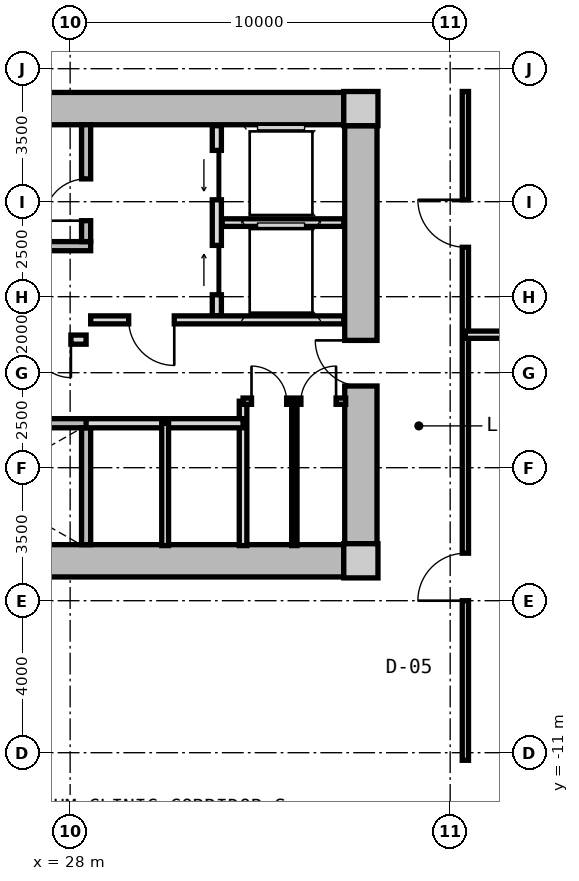
"""IFC4 building model, lengths in metres.
Left out: names, types, materials, properties, quantities, classifications, styles, units other than length and angle.
Written with IfcOpenShell. Run it as: python <this file> out.ifc"""

import sys

from ifc_helpers import new_model, si_unit, direction, frame, frame_2d, origin, origin_2d, place, context, subcontext, project, spatial, rectangle, extrude, source, transform, mapped, element, fill, save


model = new_model("IFC4")
c1 = context("Model", 3, precision=1e-05, world=origin(), true_north=direction((0.0, 1.0)))
c2 = subcontext(c1, "Body", "Model", "MODEL_VIEW")
j1 = project(units=[si_unit("LENGTHUNIT", "METRE"), si_unit("PLANEANGLEUNIT", "RADIAN")], contexts=[c1])
p1 = place(None, origin())
s1 = spatial("IfcSite", under=j1, at=p1, CompositionType="ELEMENT")
p2 = place(p1, origin())
s2 = spatial("IfcBuilding", under=s1, at=p2, CompositionType="ELEMENT")
p3 = place(p2, frame((0.0, 0.0, 8.4)))
s3 = spatial("IfcBuildingStorey", under=s2, at=p3, CompositionType="ELEMENT", Elevation=8.4)
m1 = source(origin(), c2, "Body", "SweptSolid", [
    extrude(rectangle(XDim=0.9, YDim=0.9, at=origin_2d()), origin(), (0.0, 0.0, 1.0), 4.2),
])
for number, where, z_axis, x_axis in (
    (1, (35.65, -5.95, 0.0), (0.0, 0.0, 1.0), (1.0, 0.0, 0.0)),
    (2, (35.65, 5.95, 0.0), (0.0, 0.0, 1.0), (1.0, 0.0, 0.0)),
):
    element("IfcColumn", number, at=place(p3, frame(where, z_axis=z_axis, x_axis=x_axis)), inside=s3, PredefinedType="COLUMN", context=c2, shape_type="MappedRepresentation", body=[
        mapped(m1, transform((0.0, 0.0, 0.0), x_axis=(1.0, 0.0, 0.0), y_axis=(0.0, 1.0, 0.0), z_axis=(0.0, 0.0, 1.0), scale=1.0)),
    ])
m2 = source(origin(), c2, "Body", "SweptSolid", [
    extrude(rectangle(XDim=14.4, YDim=0.85, at=frame_2d((7.2, 0.0))), origin(), (0.0, 0.0, 1.0), 3.88),
])
for number, where, z_axis, x_axis in (
    (3, (20.8, 5.95, 0.0), (0.0, 0.0, 1.0), (1.0, 0.0, 0.0)),
    (4, (35.2, -5.95, 0.0), (0.0, 0.0, 1.0), (-1.0, 0.0, 0.0)),
):
    element("IfcWall", number, at=place(p3, frame(where, z_axis=z_axis, x_axis=x_axis)), inside=s3, PredefinedType="SHEAR", context=c2, shape_type="MappedRepresentation", body=[
        mapped(m2, transform((0.0, 0.0, 0.0), x_axis=(1.0, 0.0, 0.0), y_axis=(0.0, 1.0, 0.0), z_axis=(0.0, 0.0, 1.0), scale=1.0)),
    ])
m3 = source(origin(), c2, "Body", "SweptSolid", [
    extrude(rectangle(XDim=11.0, YDim=0.85, at=frame_2d((5.5, 0.0))), origin(), (0.0, 0.0, 1.0), 3.88),
])
p4 = place(p3, frame((35.65, 5.5, 0.0), z_axis=(0.0, 0.0, 1.0), x_axis=(0.0, -1.0, 0.0)))
e5 = element("IfcWall", 5, at=p4, inside=s3, PredefinedType="SHEAR", context=c2, shape_type="MappedRepresentation", body=[
    mapped(m3, transform((0.0, 0.0, 0.0), x_axis=(1.0, 0.0, 0.0), y_axis=(0.0, 1.0, 0.0), z_axis=(0.0, 0.0, 1.0), scale=1.0)),
])
p5 = place(p4, frame((5.65, 0.0, 0.0)))
e6 = element("IfcOpeningElement", 6, at=p5, cuts=e5, PredefinedType="OPENING", context=c2, shape_type="SweptSolid", body=[
    extrude(rectangle(XDim=1.2, YDim=2.15, at=frame_2d((0.6, 1.075))), frame((0.0, 0.435, 0.0), z_axis=(0.0, -1.0, 0.0), x_axis=(1.0, 0.0, 0.0)), (0.0, 0.0, 1.0), 0.87),
])
m4 = source(origin(), c2, "Body", "SweptSolid", [
    extrude(rectangle(XDim=7.765, YDim=0.24, at=frame_2d((3.883, 0.0))), origin(), (0.0, 0.0, 1.0), 3.88),
])
p6 = place(p3, frame((20.775, 2.33, 0.0), z_axis=(0.0, 0.0, 1.0), x_axis=(1.0, 0.0, 0.0)))
e7 = element("IfcWall", 7, at=p6, inside=s3, PredefinedType="PARTITIONING", context=c2, shape_type="MappedRepresentation", body=[
    mapped(m4, transform((0.0, 0.0, 0.0), x_axis=(1.0, 0.0, 0.0), y_axis=(0.0, 1.0, 0.0), z_axis=(0.0, 0.0, 1.0), scale=1.0)),
])
m5 = source(origin(), c2, "Body", "SweptSolid", [
    extrude(rectangle(XDim=3.075, YDim=0.24, at=frame_2d((1.538, 0.0))), origin(), (0.0, 0.0, 1.0), 3.88),
])
p7 = place(p3, frame((28.42, 2.45, 0.0), z_axis=(0.0, 0.0, 1.0), x_axis=(0.0, 1.0, 0.0)))
e8 = element("IfcWall", 8, at=p7, inside=s3, PredefinedType="PARTITIONING", context=c2, shape_type="MappedRepresentation", body=[
    mapped(m5, transform((0.0, 0.0, 0.0), x_axis=(1.0, 0.0, 0.0), y_axis=(0.0, 1.0, 0.0), z_axis=(0.0, 0.0, 1.0), scale=1.0)),
])
p8 = place(p7, frame((0.55, 0.0, 0.0)))
e9 = element("IfcOpeningElement", 9, at=p8, cuts=e8, PredefinedType="OPENING", context=c2, shape_type="SweptSolid", body=[
    extrude(rectangle(XDim=1.1, YDim=2.15, at=frame_2d((0.55, 1.075))), frame((0.0, 0.13, 0.0), z_axis=(0.0, -1.0, 0.0), x_axis=(1.0, 0.0, 0.0)), (0.0, 0.0, 1.0), 0.26),
])
p9 = place(p3, frame((20.775, -2.33, 0.0), z_axis=(0.0, 0.0, 1.0), x_axis=(1.0, 0.0, 0.0)))
e10 = element("IfcWall", 10, at=p9, inside=s3, PredefinedType="PARTITIONING", context=c2, shape_type="MappedRepresentation", body=[
    mapped(m4, transform((0.0, 0.0, 0.0), x_axis=(1.0, 0.0, 0.0), y_axis=(0.0, 1.0, 0.0), z_axis=(0.0, 0.0, 1.0), scale=1.0)),
])
p10 = place(p9, frame((0.885, 0.0, 0.0)))
e11 = element("IfcOpeningElement", 11, at=p10, cuts=e10, PredefinedType="OPENING", context=c2, shape_type="SweptSolid", body=[
    extrude(rectangle(XDim=1.1, YDim=2.15, at=frame_2d((0.55, 1.075))), frame((0.0, 0.13, 0.0), z_axis=(0.0, -1.0, 0.0), x_axis=(1.0, 0.0, 0.0)), (0.0, 0.0, 1.0), 0.26),
])
p11 = place(p3, frame((28.42, -5.525, 0.0), z_axis=(0.0, 0.0, 1.0), x_axis=(0.0, 1.0, 0.0)))
e12 = element("IfcWall", 12, at=p11, inside=s3, PredefinedType="PARTITIONING", context=c2, shape_type="MappedRepresentation", body=[
    mapped(m5, transform((0.0, 0.0, 0.0), x_axis=(1.0, 0.0, 0.0), y_axis=(0.0, 1.0, 0.0), z_axis=(0.0, 0.0, 1.0), scale=1.0)),
])
m6 = source(origin(), c2, "Body", "SweptSolid", [
    extrude(rectangle(XDim=5.0, YDim=0.24, at=frame_2d((2.5, 0.0))), origin(), (0.0, 0.0, 1.0), 3.865),
])
p12 = place(p3, frame((31.86, 0.5, 0.0), z_axis=(0.0, 0.0, 1.0), x_axis=(0.0, 1.0, 0.0)))
e13 = element("IfcWall", 13, at=p12, inside=s3, PredefinedType="PARTITIONING", context=c2, shape_type="MappedRepresentation", body=[
    mapped(m6, transform((0.0, 0.0, 0.0), x_axis=(1.0, 0.0, 0.0), y_axis=(0.0, 1.0, 0.0), z_axis=(0.0, 0.0, 1.0), scale=1.0)),
])
p13 = place(p12, frame((3.05, 0.0, 0.0)))
e14 = element("IfcOpeningElement", 14, at=p13, cuts=e13, PredefinedType="OPENING", context=c2, shape_type="SweptSolid", body=[
    extrude(rectangle(XDim=1.3, YDim=2.2, at=frame_2d((0.65, 1.1))), frame((0.0, 0.13, 0.0), z_axis=(0.0, -1.0, 0.0), x_axis=(1.0, 0.0, 0.0)), (0.0, 0.0, 1.0), 0.26),
])
p14 = place(p12, frame((0.55, 0.0, 0.0)))
e15 = element("IfcOpeningElement", 15, at=p14, cuts=e13, PredefinedType="OPENING", context=c2, shape_type="SweptSolid", body=[
    extrude(rectangle(XDim=1.3, YDim=2.2, at=frame_2d((0.65, 1.1))), frame((0.0, 0.13, 0.0), z_axis=(0.0, -1.0, 0.0), x_axis=(1.0, 0.0, 0.0)), (0.0, 0.0, 1.0), 0.26),
])
m7 = source(origin(), c2, "Body", "SweptSolid", [
    extrude(rectangle(XDim=3.2, YDim=0.2, at=frame_2d((1.6, 0.0))), origin(), (0.0, 0.0, 1.0), 3.865),
])
p15 = place(p3, frame((32.0, 2.95, 0.0), z_axis=(0.0, 0.0, 1.0), x_axis=(1.0, 0.0, 0.0)))
e16 = element("IfcWall", 16, at=p15, inside=s3, PredefinedType="PARTITIONING", context=c2, shape_type="MappedRepresentation", body=[
    mapped(m7, transform((0.0, 0.0, 0.0), x_axis=(1.0, 0.0, 0.0), y_axis=(0.0, 1.0, 0.0), z_axis=(0.0, 0.0, 1.0), scale=1.0)),
])
m8 = source(origin(), c2, "Body", "SweptSolid", [
    extrude(rectangle(XDim=6.66, YDim=0.21, at=frame_2d((3.33, 0.0))), origin(), (0.0, 0.0, 1.0), 3.865),
])
p16 = place(p3, frame((28.54, 0.39, 0.0), z_axis=(0.0, 0.0, 1.0), x_axis=(1.0, 0.0, 0.0)))
e17 = element("IfcWall", 17, at=p16, inside=s3, PredefinedType="PARTITIONING", context=c2, shape_type="MappedRepresentation", body=[
    mapped(m8, transform((0.0, 0.0, 0.0), x_axis=(1.0, 0.0, 0.0), y_axis=(0.0, 1.0, 0.0), z_axis=(0.0, 0.0, 1.0), scale=1.0)),
])
p17 = place(p16, frame((1.0, 0.0, 0.0)))
e18 = element("IfcOpeningElement", 18, at=p17, cuts=e17, PredefinedType="OPENING", context=c2, shape_type="SweptSolid", body=[
    extrude(rectangle(XDim=1.2, YDim=2.15, at=frame_2d((0.6, 1.075))), frame((0.0, 0.115, 0.0), z_axis=(0.0, -1.0, 0.0), x_axis=(1.0, 0.0, 0.0)), (0.0, 0.0, 1.0), 0.23),
])
m9 = source(origin(), c2, "Body", "SweptSolid", [
    extrude(rectangle(XDim=7.62, YDim=0.24, at=frame_2d((3.81, 0.0))), origin(), (0.0, 0.0, 1.0), 3.865),
])
p18 = place(p3, frame((20.8, -0.13, 0.0), z_axis=(0.0, 0.0, 1.0), x_axis=(1.0, 0.0, 0.0)))
e19 = element("IfcWall", 19, at=p18, inside=s3, PredefinedType="PARTITIONING", context=c2, shape_type="MappedRepresentation", body=[
    mapped(m9, transform((0.0, 0.0, 0.0), x_axis=(1.0, 0.0, 0.0), y_axis=(0.0, 1.0, 0.0), z_axis=(0.0, 0.0, 1.0), scale=1.0)),
])
p19 = place(p18, frame((6.22, 0.0, 0.0)))
e20 = element("IfcOpeningElement", 20, at=p19, cuts=e19, PredefinedType="OPENING", context=c2, shape_type="SweptSolid", body=[
    extrude(rectangle(XDim=1.0, YDim=2.1, at=frame_2d((0.5, 1.05))), frame((0.0, 0.13, 0.0), z_axis=(0.0, -1.0, 0.0), x_axis=(1.0, 0.0, 0.0)), (0.0, 0.0, 1.0), 0.26),
])
p20 = place(p18, frame((0.85, 0.0, 0.0)))
e21 = element("IfcOpeningElement", 21, at=p20, cuts=e19, PredefinedType="OPENING", context=c2, shape_type="SweptSolid", body=[
    extrude(rectangle(XDim=1.1, YDim=2.2, at=frame_2d((0.55, 1.1))), frame((0.0, 0.13, 0.0), z_axis=(0.0, -1.0, 0.0), x_axis=(1.0, 0.0, 0.0)), (0.0, 0.0, 1.0), 0.26),
])
p21 = place(p18, frame((3.85, 0.0, 0.0)))
e22 = element("IfcOpeningElement", 22, at=p21, cuts=e19, PredefinedType="OPENING", context=c2, shape_type="SweptSolid", body=[
    extrude(rectangle(XDim=1.1, YDim=2.2, at=frame_2d((0.55, 1.1))), frame((0.0, 0.13, 0.0), z_axis=(0.0, -1.0, 0.0), x_axis=(1.0, 0.0, 0.0)), (0.0, 0.0, 1.0), 0.26),
])
m10 = source(origin(), c2, "Body", "SweptSolid", [
    extrude(rectangle(XDim=3.8, YDim=0.2, at=frame_2d((1.9, 0.0))), origin(), (0.0, 0.0, 1.0), 3.865),
])
p22 = place(p3, frame((32.55, -5.55, 0.0), z_axis=(0.0, 0.0, 1.0), x_axis=(0.0, 1.0, 0.0)))
e23 = element("IfcWall", 23, at=p22, inside=s3, PredefinedType="PARTITIONING", context=c2, shape_type="MappedRepresentation", body=[
    mapped(m10, transform((0.0, 0.0, 0.0), x_axis=(1.0, 0.0, 0.0), y_axis=(0.0, 1.0, 0.0), z_axis=(0.0, 0.0, 1.0), scale=1.0)),
])
m11 = source(origin(), c2, "Body", "SweptSolid", [
    extrude(rectangle(XDim=4.13, YDim=0.24, at=frame_2d((2.065, 0.0))), origin(), (0.0, 0.0, 1.0), 3.865),
])
p23 = place(p3, frame((28.42, -2.33, 0.0), z_axis=(0.0, 0.0, 1.0), x_axis=(1.0, 0.0, 0.0)))
e24 = element("IfcWall", 24, at=p23, inside=s3, PredefinedType="PARTITIONING", context=c2, shape_type="MappedRepresentation", body=[
    mapped(m11, transform((0.0, 0.0, 0.0), x_axis=(1.0, 0.0, 0.0), y_axis=(0.0, 1.0, 0.0), z_axis=(0.0, 0.0, 1.0), scale=1.0)),
])
m12 = source(origin(), c2, "Body", "SweptSolid", [
    extrude(rectangle(XDim=3.22, YDim=0.18, at=frame_2d((1.61, 0.0))), origin(), (0.0, 0.0, 1.0), 3.865),
])
p24 = place(p3, frame((30.5, -5.55, 0.0), z_axis=(0.0, 0.0, 1.0), x_axis=(0.0, 1.0, 0.0)))
e25 = element("IfcWall", 25, at=p24, inside=s3, PredefinedType="PARTITIONING", context=c2, shape_type="MappedRepresentation", body=[
    mapped(m12, transform((0.0, 0.0, 0.0), x_axis=(1.0, 0.0, 0.0), y_axis=(0.0, 1.0, 0.0), z_axis=(0.0, 0.0, 1.0), scale=1.0)),
])
m13 = source(origin(), c2, "Body", "SweptSolid", [
    extrude(rectangle(XDim=2.7, YDim=0.165, at=frame_2d((1.35, 0.0))), origin(), (0.0, 0.0, 1.0), 3.865),
])
p25 = place(p3, frame((32.55, -1.75, 0.0), z_axis=(0.0, 0.0, 1.0), x_axis=(1.0, 0.0, 0.0)))
e26 = element("IfcWall", 26, at=p25, inside=s3, PredefinedType="PARTITIONING", context=c2, shape_type="MappedRepresentation", body=[
    mapped(m13, transform((0.0, 0.0, 0.0), x_axis=(1.0, 0.0, 0.0), y_axis=(0.0, 1.0, 0.0), z_axis=(0.0, 0.0, 1.0), scale=1.0)),
])
p26 = place(p25, frame((0.222, 0.0, 0.0)))
e27 = element("IfcOpeningElement", 27, at=p26, cuts=e26, PredefinedType="OPENING", context=c2, shape_type="SweptSolid", body=[
    extrude(rectangle(XDim=0.925, YDim=2.1, at=frame_2d((0.462, 1.05))), frame((0.0, 0.093, 0.0), z_axis=(0.0, -1.0, 0.0), x_axis=(1.0, 0.0, 0.0)), (0.0, 0.0, 1.0), 0.185),
])
p27 = place(p25, frame((1.522, 0.0, 0.0)))
e28 = element("IfcOpeningElement", 28, at=p27, cuts=e26, PredefinedType="OPENING", context=c2, shape_type="SweptSolid", body=[
    extrude(rectangle(XDim=0.925, YDim=2.1, at=frame_2d((0.462, 1.05))), frame((0.0, 0.093, 0.0), z_axis=(0.0, -1.0, 0.0), x_axis=(1.0, 0.0, 0.0)), (0.0, 0.0, 1.0), 0.185),
])
m14 = source(origin(), c2, "Body", "SweptSolid", [
    extrude(rectangle(XDim=3.8, YDim=0.14, at=frame_2d((1.9, 0.0))), origin(), (0.0, 0.0, 1.0), 3.865),
])
p28 = place(p3, frame((33.9, -5.55, 0.0), z_axis=(0.0, 0.0, 1.0), x_axis=(0.0, 1.0, 0.0)))
e29 = element("IfcWall", 29, at=p28, inside=s3, PredefinedType="PARTITIONING", context=c2, shape_type="MappedRepresentation", body=[
    mapped(m14, transform((0.0, 0.0, 0.0), x_axis=(1.0, 0.0, 0.0), y_axis=(0.0, 1.0, 0.0), z_axis=(0.0, 0.0, 1.0), scale=1.0)),
])
m15 = source(origin(), c2, "Body", "SweptSolid", [
    extrude(rectangle(XDim=17.6, YDim=0.165, at=frame_2d((8.8, 0.0))), origin(), (0.0, 0.0, 1.0), 3.865),
])
p29 = place(p3, frame((38.4, -11.2, 0.0), z_axis=(0.0, 0.0, 1.0), x_axis=(0.0, 1.0, 0.0)))
e30 = element("IfcWall", 30, at=p29, inside=s3, PredefinedType="PARTITIONING", context=c2, shape_type="MappedRepresentation", body=[
    mapped(m15, transform((0.0, 0.0, 0.0), x_axis=(1.0, 0.0, 0.0), y_axis=(0.0, 1.0, 0.0), z_axis=(0.0, 0.0, 1.0), scale=1.0)),
])
p30 = place(p29, frame((4.2, 0.0, 0.0)))
e31 = element("IfcOpeningElement", 31, at=p30, cuts=e30, PredefinedType="OPENING", context=c2, shape_type="SweptSolid", body=[
    extrude(rectangle(XDim=1.25, YDim=2.2, at=frame_2d((0.625, 1.1))), frame((0.0, 0.093, 0.0), z_axis=(0.0, -1.0, 0.0), x_axis=(1.0, 0.0, 0.0)), (0.0, 0.0, 1.0), 0.185),
])
p31 = place(p29, frame((13.5, 0.0, 0.0)))
e32 = element("IfcOpeningElement", 32, at=p31, cuts=e30, PredefinedType="OPENING", context=c2, shape_type="SweptSolid", body=[
    extrude(rectangle(XDim=1.25, YDim=2.2, at=frame_2d((0.625, 1.1))), frame((0.0, 0.093, 0.0), z_axis=(0.0, -1.0, 0.0), x_axis=(1.0, 0.0, 0.0)), (0.0, 0.0, 1.0), 0.185),
])
m16 = source(origin(), c2, "Body", "SweptSolid", [
    extrude(rectangle(XDim=12.65, YDim=0.19, at=frame_2d((6.325, 0.0))), origin(), (0.0, 0.0, 1.0), 3.865),
])
p32 = place(p3, frame((38.4, 0.0, 0.0), z_axis=(0.0, 0.0, 1.0), x_axis=(1.0, 0.0, 0.0)))
e33 = element("IfcWall", 33, at=p32, inside=s3, PredefinedType="PARTITIONING", context=c2, shape_type="MappedRepresentation", body=[
    mapped(m16, transform((0.0, 0.0, 0.0), x_axis=(1.0, 0.0, 0.0), y_axis=(0.0, 1.0, 0.0), z_axis=(0.0, 0.0, 1.0), scale=1.0)),
])
m17 = source(origin(), c2, "Body", "SweptSolid", [
    extrude(rectangle(XDim=1.1, YDim=2.15, at=frame_2d((0.55, 1.075))), frame((0.0, 0.025, 0.0), z_axis=(0.0, -1.0, 0.0), x_axis=(1.0, 0.0, 0.0)), (0.0, 0.0, 1.0), 0.05),
])
p33 = place(p8, origin())
e34 = element("IfcDoor", 34, at=p33, inside=s3, OperationType="SINGLE_SWING_LEFT", PredefinedType="DOOR", context=c2, shape_type="MappedRepresentation", body=[
    mapped(m17, transform((0.0, 0.0, 0.0), x_axis=(1.0, 0.0, 0.0), y_axis=(0.0, 1.0, 0.0), z_axis=(0.0, 0.0, 1.0), scale=1.0)),
])
fill(e9, e34)
m18 = source(origin(), c2, "Body", "SweptSolid", [
    extrude(rectangle(XDim=1.3, YDim=2.2, at=frame_2d((0.65, 1.1))), frame((0.0, 0.025, 0.0), z_axis=(0.0, -1.0, 0.0), x_axis=(1.0, 0.0, 0.0)), (0.0, 0.0, 1.0), 0.05),
])
p34 = place(p13, origin())
e35 = element("IfcDoor", 35, at=p34, inside=s3, OperationType="SLIDING_TO_LEFT", PredefinedType="DOOR", context=c2, shape_type="MappedRepresentation", body=[
    mapped(m18, transform((0.0, 0.0, 0.0), x_axis=(1.0, 0.0, 0.0), y_axis=(0.0, 1.0, 0.0), z_axis=(0.0, 0.0, 1.0), scale=1.0)),
])
fill(e14, e35)
p35 = place(p14, origin())
e36 = element("IfcDoor", 36, at=p35, inside=s3, OperationType="SLIDING_TO_RIGHT", PredefinedType="DOOR", context=c2, shape_type="MappedRepresentation", body=[
    mapped(m18, transform((0.0, 0.0, 0.0), x_axis=(1.0, 0.0, 0.0), y_axis=(0.0, 1.0, 0.0), z_axis=(0.0, 0.0, 1.0), scale=1.0)),
])
fill(e15, e36)
m19 = source(origin(), c2, "Body", "SweptSolid", [
    extrude(rectangle(XDim=1.2, YDim=2.15, at=frame_2d((0.6, 1.075))), frame((0.0, 0.025, 0.0), z_axis=(0.0, -1.0, 0.0), x_axis=(1.0, 0.0, 0.0)), (0.0, 0.0, 1.0), 0.05),
])
p36 = place(p17, frame((1.2, 0.0, 0.0), z_axis=(0.0, 0.0, 1.0), x_axis=(-1.0, 0.0, 0.0)))
e37 = element("IfcDoor", 37, at=p36, inside=s3, OperationType="SINGLE_SWING_LEFT", PredefinedType="DOOR", context=c2, shape_type="MappedRepresentation", body=[
    mapped(m19, transform((0.0, 0.0, 0.0), x_axis=(1.0, 0.0, 0.0), y_axis=(0.0, 1.0, 0.0), z_axis=(0.0, 0.0, 1.0), scale=1.0)),
])
fill(e18, e37)
p37 = place(p5, frame((1.2, 0.0, 0.0), z_axis=(0.0, 0.0, 1.0), x_axis=(-1.0, 0.0, 0.0)))
e38 = element("IfcDoor", 38, at=p37, inside=s3, OperationType="SINGLE_SWING_RIGHT", PredefinedType="DOOR", context=c2, shape_type="MappedRepresentation", body=[
    mapped(m19, transform((0.0, 0.0, 0.0), x_axis=(1.0, 0.0, 0.0), y_axis=(0.0, 1.0, 0.0), z_axis=(0.0, 0.0, 1.0), scale=1.0)),
])
fill(e6, e38)
m20 = source(origin(), c2, "Body", "SweptSolid", [
    extrude(rectangle(XDim=1.0, YDim=2.1, at=frame_2d((0.5, 1.05))), frame((0.0, 0.025, 0.0), z_axis=(0.0, -1.0, 0.0), x_axis=(1.0, 0.0, 0.0)), (0.0, 0.0, 1.0), 0.05),
])
p38 = place(p19, frame((1.0, 0.0, 0.0), z_axis=(0.0, 0.0, 1.0), x_axis=(-1.0, 0.0, 0.0)))
e39 = element("IfcDoor", 39, at=p38, inside=s3, OperationType="SINGLE_SWING_LEFT", PredefinedType="DOOR", context=c2, shape_type="MappedRepresentation", body=[
    mapped(m20, transform((0.0, 0.0, 0.0), x_axis=(1.0, 0.0, 0.0), y_axis=(0.0, 1.0, 0.0), z_axis=(0.0, 0.0, 1.0), scale=1.0)),
])
fill(e20, e39)
m21 = source(origin(), c2, "Body", "SweptSolid", [
    extrude(rectangle(XDim=0.925, YDim=2.1, at=frame_2d((0.462, 1.05))), frame((0.0, 0.025, 0.0), z_axis=(0.0, -1.0, 0.0), x_axis=(1.0, 0.0, 0.0)), (0.0, 0.0, 1.0), 0.05),
])
p39 = place(p26, origin())
e40 = element("IfcDoor", 40, at=p39, inside=s3, OperationType="SINGLE_SWING_LEFT", PredefinedType="DOOR", context=c2, shape_type="MappedRepresentation", body=[
    mapped(m21, transform((0.0, 0.0, 0.0), x_axis=(1.0, 0.0, 0.0), y_axis=(0.0, 1.0, 0.0), z_axis=(0.0, 0.0, 1.0), scale=1.0)),
])
fill(e27, e40)
p40 = place(p27, origin())
e41 = element("IfcDoor", 41, at=p40, inside=s3, OperationType="SINGLE_SWING_RIGHT", PredefinedType="DOOR", context=c2, shape_type="MappedRepresentation", body=[
    mapped(m21, transform((0.0, 0.0, 0.0), x_axis=(1.0, 0.0, 0.0), y_axis=(0.0, 1.0, 0.0), z_axis=(0.0, 0.0, 1.0), scale=1.0)),
])
fill(e28, e41)
m22 = source(origin(), c2, "Body", "SweptSolid", [
    extrude(rectangle(XDim=1.25, YDim=2.2, at=frame_2d((0.625, 1.1))), frame((0.0, 0.025, 0.0), z_axis=(0.0, -1.0, 0.0), x_axis=(1.0, 0.0, 0.0)), (0.0, 0.0, 1.0), 0.05),
])
p41 = place(p30, origin())
e42 = element("IfcDoor", 42, at=p41, inside=s3, OperationType="SINGLE_SWING_LEFT", PredefinedType="DOOR", context=c2, shape_type="MappedRepresentation", body=[
    mapped(m22, transform((0.0, 0.0, 0.0), x_axis=(1.0, 0.0, 0.0), y_axis=(0.0, 1.0, 0.0), z_axis=(0.0, 0.0, 1.0), scale=1.0)),
])
fill(e31, e42)
p42 = place(p31, origin())
e43 = element("IfcDoor", 43, at=p42, inside=s3, OperationType="SINGLE_SWING_RIGHT", PredefinedType="DOOR", context=c2, shape_type="MappedRepresentation", body=[
    mapped(m22, transform((0.0, 0.0, 0.0), x_axis=(1.0, 0.0, 0.0), y_axis=(0.0, 1.0, 0.0), z_axis=(0.0, 0.0, 1.0), scale=1.0)),
])
fill(e32, e43)
save(model, sys.argv[1])
